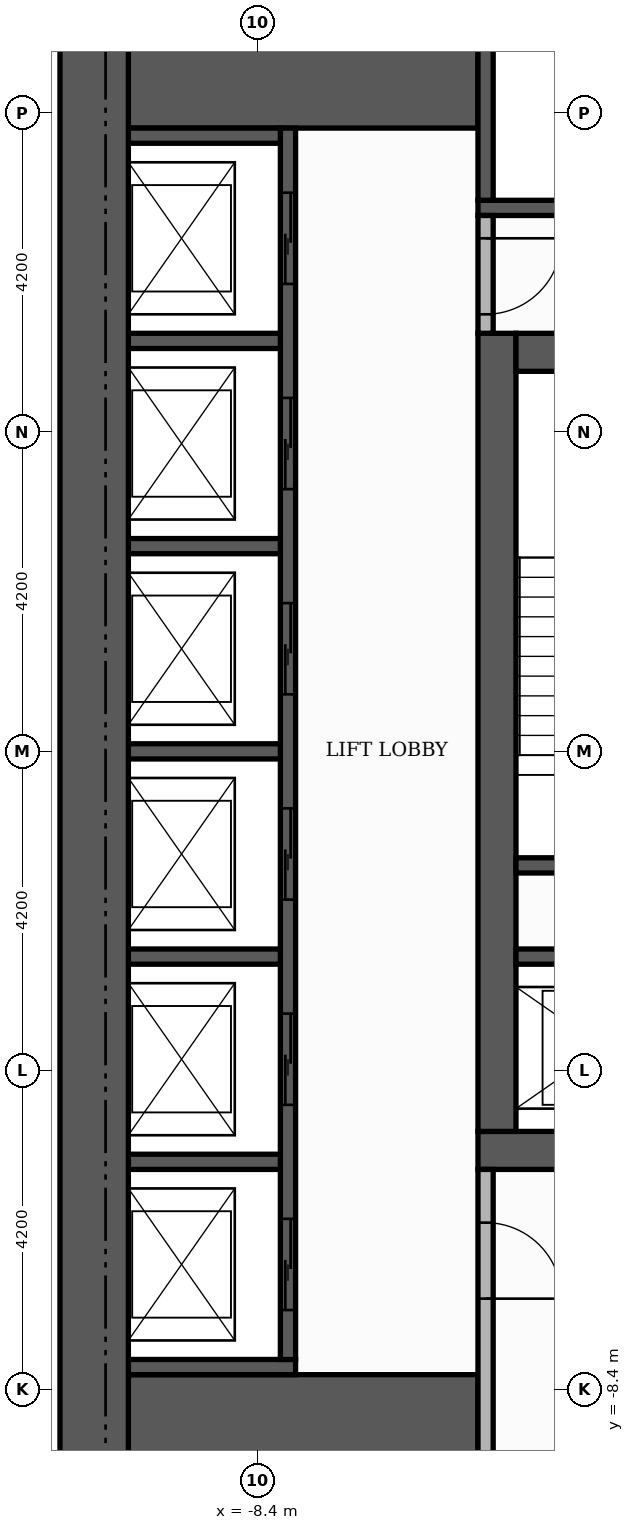
"""IFC4 building model, lengths in metres.
Left out: names, types, materials, properties, quantities, classifications, styles, units other than length and angle.
Written with IfcOpenShell. Run it as: python <this file> out.ifc"""

import sys

from ifc_helpers import new_model, si_unit, direction, frame, frame_2d, origin, place, context, subcontext, project, spatial, rectangle, extrude, element, fill, save


model = new_model("IFC4")
c1 = context("Model", 3, precision=1e-05, world=origin(), true_north=direction((0.0, 1.0)))
c2 = subcontext(c1, "Body", "Model", "MODEL_VIEW")
j1 = project(units=[si_unit("LENGTHUNIT", "METRE"), si_unit("PLANEANGLEUNIT", "RADIAN")], contexts=[c1])
p1 = place(None, origin())
s1 = spatial("IfcSite", under=j1, at=p1, CompositionType="ELEMENT")
p2 = place(p1, origin())
s2 = spatial("IfcBuilding", under=s1, at=p2, CompositionType="ELEMENT")
p3 = place(p2, frame((0.0, 0.0, 90.9)))
s3 = spatial("IfcBuildingStorey", under=s2, at=p3, CompositionType="ELEMENT", Elevation=90.9)
p4 = place(p3, frame((-5.5, -5.25, 0.0), z_axis=(0.0, 0.0, 1.0), x_axis=(1.0, 0.0, 0.0)))
e1 = element("IfcWall", 1, at=p4, inside=s3, PredefinedType="SHEAR", context=c2, shape_type="SweptSolid", body=[
    extrude(rectangle(XDim=11.0, YDim=0.5, at=frame_2d((5.5, 0.0))), origin(), (0.0, 0.0, 1.0), 3.48),
])
p5 = place(p4, frame((4.9, 0.0, 0.0)))
e2 = element("IfcOpeningElement", 2, at=p5, cuts=e1, PredefinedType="OPENING", context=c2, shape_type="SweptSolid", body=[
    extrude(rectangle(XDim=1.2, YDim=2.1, at=frame_2d((0.6, 1.05))), frame((0.0, 0.26, 0.0), z_axis=(0.0, -1.0, 0.0), x_axis=(1.0, 0.0, 0.0)), (0.0, 0.0, 1.0), 0.52),
])
p6 = place(p3, frame((-5.25, -5.0, 0.0), z_axis=(0.0, 0.0, 1.0), x_axis=(0.0, 1.0, 0.0)))
e3 = element("IfcWall", 3, at=p6, inside=s3, PredefinedType="SHEAR", context=c2, shape_type="SweptSolid", body=[
    extrude(rectangle(XDim=10.5, YDim=0.5, at=frame_2d((5.25, 0.0))), origin(), (0.0, 0.0, 1.0), 3.48),
])
p7 = place(p3, frame((-5.0, 5.25, 0.0), z_axis=(0.0, 0.0, 1.0), x_axis=(1.0, 0.0, 0.0)))
e4 = element("IfcWall", 4, at=p7, inside=s3, PredefinedType="SHEAR", context=c2, shape_type="SweptSolid", body=[
    extrude(rectangle(XDim=10.0, YDim=0.5, at=frame_2d((5.0, 0.0))), origin(), (0.0, 0.0, 1.0), 3.48),
])
p8 = place(p7, frame((4.4, 0.0, 0.0)))
e5 = element("IfcOpeningElement", 5, at=p8, cuts=e4, PredefinedType="OPENING", context=c2, shape_type="SweptSolid", body=[
    extrude(rectangle(XDim=1.2, YDim=2.1, at=frame_2d((0.6, 1.05))), frame((0.0, 0.26, 0.0), z_axis=(0.0, -1.0, 0.0), x_axis=(1.0, 0.0, 0.0)), (0.0, 0.0, 1.0), 0.52),
])
for number, where, z_axis, x_axis in (
    (6, (-10.1, -9.15, 0.0), (0.0, 0.0, 1.0), (1.0, 0.0, 0.0)),
    (7, (-10.1, 9.15, 0.0), (0.0, 0.0, 1.0), (1.0, 0.0, 0.0)),
):
    element("IfcWall", number, at=place(p3, frame(where, z_axis=z_axis, x_axis=x_axis)), inside=s3, PredefinedType="SHEAR", context=c2, shape_type="SweptSolid", body=[
        extrude(rectangle(XDim=4.6, YDim=1.9, at=frame_2d((2.3, 0.0))), origin(), (0.0, 0.0, 1.0), 3.48),
    ])
p9 = place(p3, frame((-5.0, -1.5, 0.0), z_axis=(0.0, 0.0, 1.0), x_axis=(1.0, 0.0, 0.0)))
e8 = element("IfcWall", 8, at=p9, inside=s3, PredefinedType="SHEAR", context=c2, shape_type="SweptSolid", body=[
    extrude(rectangle(XDim=3.05, YDim=0.2, at=frame_2d((1.525, 0.0))), origin(), (0.0, 0.0, 1.0), 3.48),
])
p10 = place(p3, frame((-5.5, 7.15, 0.0), z_axis=(0.0, 0.0, 1.0), x_axis=(1.0, 0.0, 0.0)))
e9 = element("IfcWall", 9, at=p10, inside=s3, PredefinedType="SHEAR", context=c2, shape_type="SweptSolid", body=[
    extrude(rectangle(XDim=6.8, YDim=0.2, at=frame_2d((3.4, 0.0))), origin(), (0.0, 0.0, 1.0), 3.48),
])
p11 = place(p3, frame((-5.4, 7.25, 0.0), z_axis=(0.0, 0.0, 1.0), x_axis=(0.0, 1.0, 0.0)))
e10 = element("IfcWall", 10, at=p11, inside=s3, PredefinedType="SHEAR", context=c2, shape_type="SweptSolid", body=[
    extrude(rectangle(XDim=2.85, YDim=0.2, at=frame_2d((1.425, 0.0))), origin(), (0.0, 0.0, 1.0), 3.48),
])
p12 = place(p3, frame((-10.1, -8.1, 0.0), z_axis=(0.0, 0.0, 1.0), x_axis=(1.0, 0.0, 0.0)))
e11 = element("IfcWall", 11, at=p12, inside=s3, PredefinedType="SHEAR", context=c2, shape_type="SweptSolid", body=[
    extrude(rectangle(XDim=2.2, YDim=0.2, at=frame_2d((1.1, 0.0))), origin(), (0.0, 0.0, 1.0), 3.48),
])
p13 = place(p3, frame((-8.0, -8.0, 0.0), z_axis=(0.0, 0.0, 1.0), x_axis=(0.0, 1.0, 0.0)))
e12 = element("IfcWall", 12, at=p13, inside=s3, PredefinedType="SHEAR", context=c2, shape_type="SweptSolid", body=[
    extrude(rectangle(XDim=16.2, YDim=0.2, at=frame_2d((8.1, 0.0))), origin(), (0.0, 0.0, 1.0), 3.48),
])
p14 = place(p13, frame((0.65, 0.0, 0.0)))
e13 = element("IfcOpeningElement", 13, at=p14, cuts=e12, PredefinedType="OPENING", context=c2, shape_type="SweptSolid", body=[
    extrude(rectangle(XDim=1.2, YDim=2.1, at=frame_2d((0.6, 1.05))), frame((0.0, 0.11, 0.0), z_axis=(0.0, -1.0, 0.0), x_axis=(1.0, 0.0, 0.0)), (0.0, 0.0, 1.0), 0.22),
])
p15 = place(p13, frame((3.35, 0.0, 0.0)))
e14 = element("IfcOpeningElement", 14, at=p15, cuts=e12, PredefinedType="OPENING", context=c2, shape_type="SweptSolid", body=[
    extrude(rectangle(XDim=1.2, YDim=2.1, at=frame_2d((0.6, 1.05))), frame((0.0, 0.11, 0.0), z_axis=(0.0, -1.0, 0.0), x_axis=(1.0, 0.0, 0.0)), (0.0, 0.0, 1.0), 0.22),
])
p16 = place(p13, frame((6.05, 0.0, 0.0)))
e15 = element("IfcOpeningElement", 15, at=p16, cuts=e12, PredefinedType="OPENING", context=c2, shape_type="SweptSolid", body=[
    extrude(rectangle(XDim=1.2, YDim=2.1, at=frame_2d((0.6, 1.05))), frame((0.0, 0.11, 0.0), z_axis=(0.0, -1.0, 0.0), x_axis=(1.0, 0.0, 0.0)), (0.0, 0.0, 1.0), 0.22),
])
p17 = place(p13, frame((8.75, 0.0, 0.0)))
e16 = element("IfcOpeningElement", 16, at=p17, cuts=e12, PredefinedType="OPENING", context=c2, shape_type="SweptSolid", body=[
    extrude(rectangle(XDim=1.2, YDim=2.1, at=frame_2d((0.6, 1.05))), frame((0.0, 0.11, 0.0), z_axis=(0.0, -1.0, 0.0), x_axis=(1.0, 0.0, 0.0)), (0.0, 0.0, 1.0), 0.22),
])
p18 = place(p13, frame((11.45, 0.0, 0.0)))
e17 = element("IfcOpeningElement", 17, at=p18, cuts=e12, PredefinedType="OPENING", context=c2, shape_type="SweptSolid", body=[
    extrude(rectangle(XDim=1.2, YDim=2.1, at=frame_2d((0.6, 1.05))), frame((0.0, 0.11, 0.0), z_axis=(0.0, -1.0, 0.0), x_axis=(1.0, 0.0, 0.0)), (0.0, 0.0, 1.0), 0.22),
])
p19 = place(p13, frame((14.15, 0.0, 0.0)))
e18 = element("IfcOpeningElement", 18, at=p19, cuts=e12, PredefinedType="OPENING", context=c2, shape_type="SweptSolid", body=[
    extrude(rectangle(XDim=1.2, YDim=2.1, at=frame_2d((0.6, 1.05))), frame((0.0, 0.11, 0.0), z_axis=(0.0, -1.0, 0.0), x_axis=(1.0, 0.0, 0.0)), (0.0, 0.0, 1.0), 0.22),
])
for number, where, z_axis, x_axis in (
    (19, (-10.1, -5.4, 0.0), (0.0, 0.0, 1.0), (1.0, 0.0, 0.0)),
    (20, (-10.1, -2.7, 0.0), (0.0, 0.0, 1.0), (1.0, 0.0, 0.0)),
):
    element("IfcWall", number, at=place(p3, frame(where, z_axis=z_axis, x_axis=x_axis)), inside=s3, PredefinedType="SHEAR", context=c2, shape_type="SweptSolid", body=[
        extrude(rectangle(XDim=2.0, YDim=0.2, at=frame_2d((1.0, 0.0))), origin(), (0.0, 0.0, 1.0), 3.48),
    ])
p20 = place(p3, frame((-5.0, -2.7, 0.0), z_axis=(0.0, 0.0, 1.0), x_axis=(1.0, 0.0, 0.0)))
e21 = element("IfcWall", 21, at=p20, inside=s3, PredefinedType="SHEAR", context=c2, shape_type="SweptSolid", body=[
    extrude(rectangle(XDim=2.85, YDim=0.2, at=frame_2d((1.425, 0.0))), origin(), (0.0, 0.0, 1.0), 3.48),
])
for number, where, z_axis, x_axis in (
    (22, (-10.1, 0.0, 0.0), (0.0, 0.0, 1.0), (1.0, 0.0, 0.0)),
    (23, (-10.1, 2.7, 0.0), (0.0, 0.0, 1.0), (1.0, 0.0, 0.0)),
    (24, (-10.1, 5.4, 0.0), (0.0, 0.0, 1.0), (1.0, 0.0, 0.0)),
    (25, (-10.1, 8.1, 0.0), (0.0, 0.0, 1.0), (1.0, 0.0, 0.0)),
):
    element("IfcWall", number, at=place(p3, frame(where, z_axis=z_axis, x_axis=x_axis)), inside=s3, PredefinedType="SHEAR", context=c2, shape_type="SweptSolid", body=[
        extrude(rectangle(XDim=2.0, YDim=0.2, at=frame_2d((1.0, 0.0))), origin(), (0.0, 0.0, 1.0), 3.48),
    ])
p21 = place(p3, frame((-10.55, -10.1, 0.0), z_axis=(0.0, 0.0, 1.0), x_axis=(0.0, 1.0, 0.0)))
e26 = element("IfcWall", 26, at=p21, inside=s3, PredefinedType="SHEAR", context=c2, shape_type="SweptSolid", body=[
    extrude(rectangle(XDim=20.2, YDim=0.9, at=frame_2d((10.1, 0.0))), origin(), (0.0, 0.0, 1.0), 3.48),
])
p22 = place(p3, frame((-5.4, -10.1, 0.0), z_axis=(0.0, 0.0, 1.0), x_axis=(0.0, 1.0, 0.0)))
e27 = element("IfcWall", 27, at=p22, inside=s3, PredefinedType="PARTITIONING", context=c2, shape_type="SweptSolid", body=[
    extrude(rectangle(XDim=4.6, YDim=0.2, at=frame_2d((2.3, 0.0))), origin(), (0.0, 0.0, 1.0), 3.48),
])
p23 = place(p22, frame((2.9, 0.0, 0.0)))
e28 = element("IfcOpeningElement", 28, at=p23, cuts=e27, PredefinedType="OPENING", context=c2, shape_type="SweptSolid", body=[
    extrude(rectangle(XDim=1.0, YDim=2.1, at=frame_2d((0.5, 1.05))), frame((0.0, 0.11, 0.0), z_axis=(0.0, -1.0, 0.0), x_axis=(1.0, 0.0, 0.0)), (0.0, 0.0, 1.0), 0.22),
])
p24 = place(p3, frame((-5.4, 5.5, 0.0), z_axis=(0.0, 0.0, 1.0), x_axis=(0.0, 1.0, 0.0)))
e29 = element("IfcWall", 29, at=p24, inside=s3, PredefinedType="PARTITIONING", context=c2, shape_type="SweptSolid", body=[
    extrude(rectangle(XDim=1.55, YDim=0.2, at=frame_2d((0.775, 0.0))), origin(), (0.0, 0.0, 1.0), 3.48),
])
p25 = place(p24, frame((0.25, 0.0, 0.0)))
e30 = element("IfcOpeningElement", 30, at=p25, cuts=e29, PredefinedType="OPENING", context=c2, shape_type="SweptSolid", body=[
    extrude(rectangle(XDim=1.0, YDim=2.1, at=frame_2d((0.5, 1.05))), frame((0.0, 0.11, 0.0), z_axis=(0.0, -1.0, 0.0), x_axis=(1.0, 0.0, 0.0)), (0.0, 0.0, 1.0), 0.22),
])
p26 = place(p14, origin())
e31 = element("IfcDoor", 31, at=p26, inside=s3, OperationType="SLIDING_TO_LEFT", PredefinedType="DOOR", context=c2, shape_type="SweptSolid", body=[
    extrude(rectangle(XDim=1.2, YDim=2.1, at=frame_2d((0.6, 1.05))), frame((0.0, 0.025, 0.0), z_axis=(0.0, -1.0, 0.0), x_axis=(1.0, 0.0, 0.0)), (0.0, 0.0, 1.0), 0.05),
])
fill(e13, e31)
p27 = place(p15, origin())
e32 = element("IfcDoor", 32, at=p27, inside=s3, OperationType="SLIDING_TO_LEFT", PredefinedType="DOOR", context=c2, shape_type="SweptSolid", body=[
    extrude(rectangle(XDim=1.2, YDim=2.1, at=frame_2d((0.6, 1.05))), frame((0.0, 0.025, 0.0), z_axis=(0.0, -1.0, 0.0), x_axis=(1.0, 0.0, 0.0)), (0.0, 0.0, 1.0), 0.05),
])
fill(e14, e32)
p28 = place(p16, origin())
e33 = element("IfcDoor", 33, at=p28, inside=s3, OperationType="SLIDING_TO_LEFT", PredefinedType="DOOR", context=c2, shape_type="SweptSolid", body=[
    extrude(rectangle(XDim=1.2, YDim=2.1, at=frame_2d((0.6, 1.05))), frame((0.0, 0.025, 0.0), z_axis=(0.0, -1.0, 0.0), x_axis=(1.0, 0.0, 0.0)), (0.0, 0.0, 1.0), 0.05),
])
fill(e15, e33)
p29 = place(p17, origin())
e34 = element("IfcDoor", 34, at=p29, inside=s3, OperationType="SLIDING_TO_LEFT", PredefinedType="DOOR", context=c2, shape_type="SweptSolid", body=[
    extrude(rectangle(XDim=1.2, YDim=2.1, at=frame_2d((0.6, 1.05))), frame((0.0, 0.025, 0.0), z_axis=(0.0, -1.0, 0.0), x_axis=(1.0, 0.0, 0.0)), (0.0, 0.0, 1.0), 0.05),
])
fill(e16, e34)
p30 = place(p18, origin())
e35 = element("IfcDoor", 35, at=p30, inside=s3, OperationType="SLIDING_TO_LEFT", PredefinedType="DOOR", context=c2, shape_type="SweptSolid", body=[
    extrude(rectangle(XDim=1.2, YDim=2.1, at=frame_2d((0.6, 1.05))), frame((0.0, 0.025, 0.0), z_axis=(0.0, -1.0, 0.0), x_axis=(1.0, 0.0, 0.0)), (0.0, 0.0, 1.0), 0.05),
])
fill(e17, e35)
p31 = place(p19, origin())
e36 = element("IfcDoor", 36, at=p31, inside=s3, OperationType="SLIDING_TO_LEFT", PredefinedType="DOOR", context=c2, shape_type="SweptSolid", body=[
    extrude(rectangle(XDim=1.2, YDim=2.1, at=frame_2d((0.6, 1.05))), frame((0.0, 0.025, 0.0), z_axis=(0.0, -1.0, 0.0), x_axis=(1.0, 0.0, 0.0)), (0.0, 0.0, 1.0), 0.05),
])
fill(e18, e36)
p32 = place(p25, frame((1.0, 0.0, 0.0), z_axis=(0.0, 0.0, 1.0), x_axis=(-1.0, 0.0, 0.0)))
e37 = element("IfcDoor", 37, at=p32, inside=s3, OperationType="SINGLE_SWING_RIGHT", PredefinedType="DOOR", context=c2, shape_type="SweptSolid", body=[
    extrude(rectangle(XDim=1.0, YDim=2.1, at=frame_2d((0.5, 1.05))), frame((0.0, 0.025, 0.0), z_axis=(0.0, -1.0, 0.0), x_axis=(1.0, 0.0, 0.0)), (0.0, 0.0, 1.0), 0.05),
])
fill(e30, e37)
p33 = place(p23, frame((1.0, 0.0, 0.0), z_axis=(0.0, 0.0, 1.0), x_axis=(-1.0, 0.0, 0.0)))
e38 = element("IfcDoor", 38, at=p33, inside=s3, OperationType="SINGLE_SWING_LEFT", PredefinedType="DOOR", context=c2, shape_type="SweptSolid", body=[
    extrude(rectangle(XDim=1.0, YDim=2.1, at=frame_2d((0.5, 1.05))), frame((0.0, 0.025, 0.0), z_axis=(0.0, -1.0, 0.0), x_axis=(1.0, 0.0, 0.0)), (0.0, 0.0, 1.0), 0.05),
])
fill(e28, e38)
save(model, sys.argv[1])
